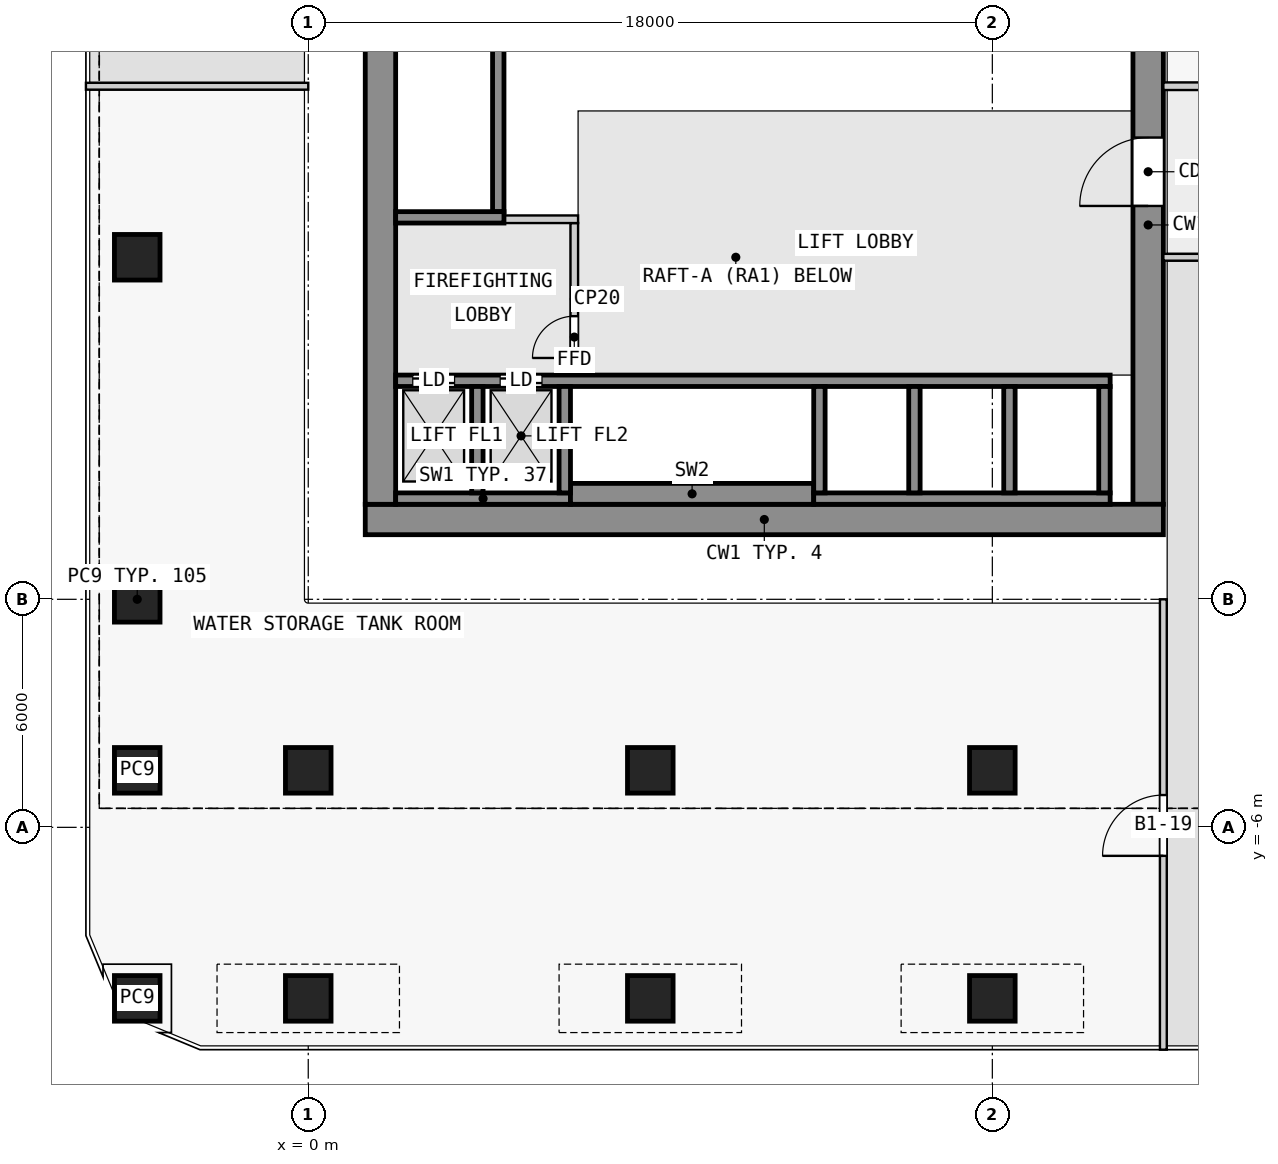
"""IFC4 building model, lengths in metres.
Left out: names, types, materials, properties, quantities, classifications, styles, units other than length and angle.
Written with IfcOpenShell. Run it as: python <this file> out.ifc"""

import sys

from ifc_helpers import new_model, si_unit, direction, frame, frame_2d, origin, origin_2d, place, context, subcontext, project, spatial, rectangle, extrude, element, fill, save


model = new_model("IFC4")
c1 = context("Model", 3, precision=1e-05, world=origin(), true_north=direction((0.0, 1.0)))
c2 = subcontext(c1, "Body", "Model", "MODEL_VIEW")
j1 = project(units=[si_unit("LENGTHUNIT", "METRE"), si_unit("PLANEANGLEUNIT", "RADIAN")], contexts=[c1])
p1 = place(None, origin())
s1 = spatial("IfcSite", under=j1, at=p1, CompositionType="ELEMENT")
p2 = place(p1, origin())
s2 = spatial("IfcBuilding", under=s1, at=p2, CompositionType="ELEMENT")
p3 = place(p2, frame((0.0, 0.0, -7.0)))
s3 = spatial("IfcBuildingStorey", under=s2, at=p3, CompositionType="ELEMENT", Elevation=-7.0)
for number, where, z_axis, x_axis in (
    (1, (-4.5, -10.5, 0.0), (0.0, 0.0, 1.0), (1.0, 0.0, 0.0)),
    (2, (-4.5, -4.5, 0.0), (0.0, 0.0, 1.0), (1.0, 0.0, 0.0)),
    (3, (-4.5, 0.0, 0.0), (0.0, 0.0, 1.0), (1.0, 0.0, 0.0)),
    (4, (-4.5, 9.0, 0.0), (0.0, 0.0, 1.0), (1.0, 0.0, 0.0)),
    (5, (0.0, -10.5, 0.0), (0.0, 0.0, 1.0), (1.0, 0.0, 0.0)),
    (6, (0.0, -4.5, 0.0), (0.0, 0.0, 1.0), (1.0, 0.0, 0.0)),
    (7, (9.0, -10.5, 0.0), (0.0, 0.0, 1.0), (1.0, 0.0, 0.0)),
    (8, (9.0, -4.5, 0.0), (0.0, 0.0, 1.0), (1.0, 0.0, 0.0)),
    (9, (18.0, -10.5, 0.0), (0.0, 0.0, 1.0), (1.0, 0.0, 0.0)),
    (10, (18.0, -4.5, 0.0), (0.0, 0.0, 1.0), (1.0, 0.0, 0.0)),
):
    element("IfcColumn", number, at=place(p3, frame(where, z_axis=z_axis, x_axis=x_axis)), inside=s3, PredefinedType="COLUMN", context=c2, shape_type="SweptSolid", body=[
        extrude(rectangle(XDim=1.2, YDim=1.2, at=origin_2d()), origin(), (0.0, 0.0, 1.0), 7.0),
    ])
p4 = place(p3, frame((1.5, 2.1, 0.0), z_axis=(0.0, 0.0, 1.0), x_axis=(1.0, 0.0, 0.0)))
e11 = element("IfcWall", 11, at=p4, inside=s3, PredefinedType="SHEAR", context=c2, shape_type="SweptSolid", body=[
    extrude(rectangle(XDim=21.0, YDim=0.8, at=frame_2d((10.5, 0.0))), origin(), (0.0, 0.0, 1.0), 6.55),
])
p5 = place(p3, frame((1.9, 2.5, 0.0), z_axis=(0.0, 0.0, 1.0), x_axis=(0.0, 1.0, 0.0)))
e12 = element("IfcWall", 12, at=p5, inside=s3, PredefinedType="SHEAR", context=c2, shape_type="SweptSolid", body=[
    extrude(rectangle(XDim=14.7, YDim=0.8, at=frame_2d((7.35, 0.0))), origin(), (0.0, 0.0, 1.0), 6.55),
])
p6 = place(p3, frame((22.1, 2.5, 0.0), z_axis=(0.0, 0.0, 1.0), x_axis=(0.0, 1.0, 0.0)))
e13 = element("IfcWall", 13, at=p6, inside=s3, PredefinedType="SHEAR", context=c2, shape_type="SweptSolid", body=[
    extrude(rectangle(XDim=14.7, YDim=0.8, at=frame_2d((7.35, 0.0))), origin(), (0.0, 0.0, 1.0), 6.55),
])
p7 = place(p6, frame((7.85, 0.0, 0.0)))
e14 = element("IfcOpeningElement", 14, at=p7, cuts=e13, PredefinedType="OPENING", context=c2, shape_type="SweptSolid", body=[
    extrude(rectangle(XDim=1.8, YDim=2.1, at=frame_2d((0.9, 1.05))), frame((0.0, 0.41, 0.0), z_axis=(0.0, -1.0, 0.0), x_axis=(1.0, 0.0, 0.0)), (0.0, 0.0, 1.0), 0.82),
])
p8 = place(p3, frame((2.3, 2.65, 0.0), z_axis=(0.0, 0.0, 1.0), x_axis=(1.0, 0.0, 0.0)))
e15 = element("IfcWall", 15, at=p8, inside=s3, PredefinedType="SHEAR", context=c2, shape_type="SweptSolid", body=[
    extrude(rectangle(XDim=4.6, YDim=0.3, at=frame_2d((2.3, 0.0))), origin(), (0.0, 0.0, 1.0), 6.55),
])
p9 = place(p3, frame((6.9, 2.775, 0.0), z_axis=(0.0, 0.0, 1.0), x_axis=(1.0, 0.0, 0.0)))
e16 = element("IfcWall", 16, at=p9, inside=s3, PredefinedType="SHEAR", context=c2, shape_type="SweptSolid", body=[
    extrude(rectangle(XDim=6.4, YDim=0.55, at=frame_2d((3.2, 0.0))), origin(), (0.0, 0.0, 1.0), 6.55),
])
p10 = place(p3, frame((13.3, 2.65, 0.0), z_axis=(0.0, 0.0, 1.0), x_axis=(1.0, 0.0, 0.0)))
e17 = element("IfcWall", 17, at=p10, inside=s3, PredefinedType="SHEAR", context=c2, shape_type="SweptSolid", body=[
    extrude(rectangle(XDim=7.8, YDim=0.3, at=frame_2d((3.9, 0.0))), origin(), (0.0, 0.0, 1.0), 6.55),
])
for number, where, z_axis, x_axis in (
    (18, (4.45, 2.8, 0.0), (0.0, 0.0, 1.0), (0.0, 1.0, 0.0)),
    (19, (6.75, 2.8, 0.0), (0.0, 0.0, 1.0), (0.0, 1.0, 0.0)),
    (20, (13.45, 2.8, 0.0), (0.0, 0.0, 1.0), (0.0, 1.0, 0.0)),
    (21, (15.95, 2.8, 0.0), (0.0, 0.0, 1.0), (0.0, 1.0, 0.0)),
    (22, (18.45, 2.8, 0.0), (0.0, 0.0, 1.0), (0.0, 1.0, 0.0)),
    (23, (20.95, 2.8, 0.0), (0.0, 0.0, 1.0), (0.0, 1.0, 0.0)),
):
    element("IfcWall", number, at=place(p3, frame(where, z_axis=z_axis, x_axis=x_axis)), inside=s3, PredefinedType="SHEAR", context=c2, shape_type="SweptSolid", body=[
        extrude(rectangle(XDim=2.8, YDim=0.3, at=frame_2d((1.4, 0.0))), origin(), (0.0, 0.0, 1.0), 6.55),
    ])
p11 = place(p3, frame((2.3, 5.75, 0.0), z_axis=(0.0, 0.0, 1.0), x_axis=(1.0, 0.0, 0.0)))
e24 = element("IfcWall", 24, at=p11, inside=s3, PredefinedType="SHEAR", context=c2, shape_type="SweptSolid", body=[
    extrude(rectangle(XDim=18.8, YDim=0.3, at=frame_2d((9.4, 0.0))), origin(), (0.0, 0.0, 1.0), 6.55),
])
p12 = place(p11, frame((0.45, 0.0, 0.0)))
e25 = element("IfcOpeningElement", 25, at=p12, cuts=e24, PredefinedType="OPENING", context=c2, shape_type="SweptSolid", body=[
    extrude(rectangle(XDim=1.1, YDim=2.1, at=frame_2d((0.55, 1.05))), frame((0.0, 0.16, 0.0), z_axis=(0.0, -1.0, 0.0), x_axis=(1.0, 0.0, 0.0)), (0.0, 0.0, 1.0), 0.32),
])
p13 = place(p11, frame((2.75, 0.0, 0.0)))
e26 = element("IfcOpeningElement", 26, at=p13, cuts=e24, PredefinedType="OPENING", context=c2, shape_type="SweptSolid", body=[
    extrude(rectangle(XDim=1.1, YDim=2.1, at=frame_2d((0.55, 1.05))), frame((0.0, 0.16, 0.0), z_axis=(0.0, -1.0, 0.0), x_axis=(1.0, 0.0, 0.0)), (0.0, 0.0, 1.0), 0.32),
])
p14 = place(p3, frame((2.3, 10.05, 0.0), z_axis=(0.0, 0.0, 1.0), x_axis=(1.0, 0.0, 0.0)))
e27 = element("IfcWall", 27, at=p14, inside=s3, PredefinedType="SHEAR", context=c2, shape_type="SweptSolid", body=[
    extrude(rectangle(XDim=2.85, YDim=0.3, at=frame_2d((1.425, 0.0))), origin(), (0.0, 0.0, 1.0), 6.55),
])
p15 = place(p3, frame((5.0, 10.2, 0.0), z_axis=(0.0, 0.0, 1.0), x_axis=(0.0, 1.0, 0.0)))
e28 = element("IfcWall", 28, at=p15, inside=s3, PredefinedType="SHEAR", context=c2, shape_type="SweptSolid", body=[
    extrude(rectangle(XDim=6.4, YDim=0.3, at=frame_2d((3.2, 0.0))), origin(), (0.0, 0.0, 1.0), 6.55),
])
p16 = place(p3, frame((7.0, 5.9, 0.0), z_axis=(0.0, 0.0, 1.0), x_axis=(0.0, 1.0, 0.0)))
e29 = element("IfcWall", 29, at=p16, inside=s3, PredefinedType="PARTITIONING", context=c2, shape_type="SweptSolid", body=[
    extrude(rectangle(XDim=4.0, YDim=0.2, at=frame_2d((2.0, 0.0))), origin(), (0.0, 0.0, 1.0), 6.55),
])
p17 = place(p16, frame((0.45, 0.0, 0.0)))
e30 = element("IfcOpeningElement", 30, at=p17, cuts=e29, PredefinedType="OPENING", context=c2, shape_type="SweptSolid", body=[
    extrude(rectangle(XDim=1.1, YDim=2.1, at=frame_2d((0.55, 1.05))), frame((0.0, 0.11, 0.0), z_axis=(0.0, -1.0, 0.0), x_axis=(1.0, 0.0, 0.0)), (0.0, 0.0, 1.0), 0.22),
])
p18 = place(p3, frame((5.15, 10.0, 0.0), z_axis=(0.0, 0.0, 1.0), x_axis=(1.0, 0.0, 0.0)))
e31 = element("IfcWall", 31, at=p18, inside=s3, PredefinedType="PARTITIONING", context=c2, shape_type="SweptSolid", body=[
    extrude(rectangle(XDim=1.95, YDim=0.2, at=frame_2d((0.975, 0.0))), origin(), (0.0, 0.0, 1.0), 6.55),
])
p19 = place(p3, frame((26.3, 9.0, 0.0), z_axis=(0.0, 0.0, 1.0), x_axis=(-1.0, 0.0, 0.0)))
e32 = element("IfcWall", 32, at=p19, inside=s3, PredefinedType="PARTITIONING", context=c2, shape_type="SweptSolid", body=[
    extrude(rectangle(XDim=3.8, YDim=0.18, at=frame_2d((1.9, 0.0))), origin(), (0.0, 0.0, 1.0), 6.55),
])
p20 = place(p19, frame((1.1, 0.0, 0.0)))
e33 = element("IfcOpeningElement", 33, at=p20, cuts=e32, PredefinedType="OPENING", context=c2, shape_type="SweptSolid", body=[
    extrude(rectangle(XDim=1.6, YDim=2.4, at=frame_2d((0.8, 1.2))), frame((0.0, 0.1, 0.0), z_axis=(0.0, -1.0, 0.0), x_axis=(1.0, 0.0, 0.0)), (0.0, 0.0, 1.0), 0.2),
])
p21 = place(p3, frame((22.5, -11.85, 0.0), z_axis=(0.0, 0.0, 1.0), x_axis=(0.0, 1.0, 0.0)))
e34 = element("IfcWall", 34, at=p21, inside=s3, PredefinedType="PARTITIONING", context=c2, shape_type="SweptSolid", body=[
    extrude(rectangle(XDim=11.85, YDim=0.18, at=frame_2d((5.925, 0.0))), origin(), (0.0, 0.0, 1.0), 6.55),
])
p22 = place(p21, frame((5.1, 0.0, 0.0)))
e35 = element("IfcOpeningElement", 35, at=p22, cuts=e34, PredefinedType="OPENING", context=c2, shape_type="SweptSolid", body=[
    extrude(rectangle(XDim=1.6, YDim=2.4, at=frame_2d((0.8, 1.2))), frame((0.0, 0.1, 0.0), z_axis=(0.0, -1.0, 0.0), x_axis=(1.0, 0.0, 0.0)), (0.0, 0.0, 1.0), 0.2),
])
p23 = place(p3, frame((0.0, 13.5, 0.0), z_axis=(0.0, 0.0, 1.0), x_axis=(-1.0, 0.0, 0.0)))
e36 = element("IfcWall", 36, at=p23, inside=s3, PredefinedType="PARTITIONING", context=c2, shape_type="SweptSolid", body=[
    extrude(rectangle(XDim=5.85, YDim=0.18, at=frame_2d((2.925, 0.0))), origin(), (0.0, 0.0, 1.0), 6.55),
])
p24 = place(p3, frame((27.0, 13.5, 0.0), z_axis=(0.0, 0.0, 1.0), x_axis=(-1.0, 0.0, 0.0)))
e37 = element("IfcWall", 37, at=p24, inside=s3, PredefinedType="PARTITIONING", context=c2, shape_type="SweptSolid", body=[
    extrude(rectangle(XDim=4.5, YDim=0.2, at=frame_2d((2.25, 0.0))), origin(), (0.0, 0.0, 1.0), 6.55),
])
p25 = place(p24, frame((1.35, 0.0, 0.0)))
e38 = element("IfcOpeningElement", 38, at=p25, cuts=e37, PredefinedType="OPENING", context=c2, shape_type="SweptSolid", body=[
    extrude(rectangle(XDim=1.8, YDim=2.1, at=frame_2d((0.9, 1.05))), frame((0.0, 0.11, 0.0), z_axis=(0.0, -1.0, 0.0), x_axis=(1.0, 0.0, 0.0)), (0.0, 0.0, 1.0), 0.22),
])
p26 = place(p17, origin())
e39 = element("IfcDoor", 39, at=p26, inside=s3, OperationType="SINGLE_SWING_LEFT", PredefinedType="DOOR", context=c2, shape_type="SweptSolid", body=[
    extrude(rectangle(XDim=1.1, YDim=2.1, at=frame_2d((0.55, 1.05))), frame((0.0, 0.025, 0.0), z_axis=(0.0, -1.0, 0.0), x_axis=(1.0, 0.0, 0.0)), (0.0, 0.0, 1.0), 0.05),
])
fill(e30, e39)
p27 = place(p12, origin())
e40 = element("IfcDoor", 40, at=p27, inside=s3, OperationType="DOUBLE_DOOR_SLIDING", PredefinedType="DOOR", context=c2, shape_type="SweptSolid", body=[
    extrude(rectangle(XDim=1.1, YDim=2.1, at=frame_2d((0.55, 1.05))), frame((0.0, 0.025, 0.0), z_axis=(0.0, -1.0, 0.0), x_axis=(1.0, 0.0, 0.0)), (0.0, 0.0, 1.0), 0.05),
])
fill(e25, e40)
p28 = place(p13, origin())
e41 = element("IfcDoor", 41, at=p28, inside=s3, OperationType="DOUBLE_DOOR_SLIDING", PredefinedType="DOOR", context=c2, shape_type="SweptSolid", body=[
    extrude(rectangle(XDim=1.1, YDim=2.1, at=frame_2d((0.55, 1.05))), frame((0.0, 0.025, 0.0), z_axis=(0.0, -1.0, 0.0), x_axis=(1.0, 0.0, 0.0)), (0.0, 0.0, 1.0), 0.05),
])
fill(e26, e41)
p29 = place(p7, origin())
e42 = element("IfcDoor", 42, at=p29, inside=s3, OperationType="DOUBLE_DOOR_SINGLE_SWING", PredefinedType="DOOR", context=c2, shape_type="SweptSolid", body=[
    extrude(rectangle(XDim=1.8, YDim=2.1, at=frame_2d((0.9, 1.05))), frame((0.0, 0.025, 0.0), z_axis=(0.0, -1.0, 0.0), x_axis=(1.0, 0.0, 0.0)), (0.0, 0.0, 1.0), 0.05),
])
fill(e14, e42)
p30 = place(p22, origin())
e43 = element("IfcDoor", 43, at=p30, inside=s3, OperationType="SINGLE_SWING_LEFT", PredefinedType="DOOR", context=c2, shape_type="SweptSolid", body=[
    extrude(rectangle(XDim=1.6, YDim=2.4, at=frame_2d((0.8, 1.2))), frame((0.0, 0.025, 0.0), z_axis=(0.0, -1.0, 0.0), x_axis=(1.0, 0.0, 0.0)), (0.0, 0.0, 1.0), 0.05),
])
fill(e35, e43)
save(model, sys.argv[1])
